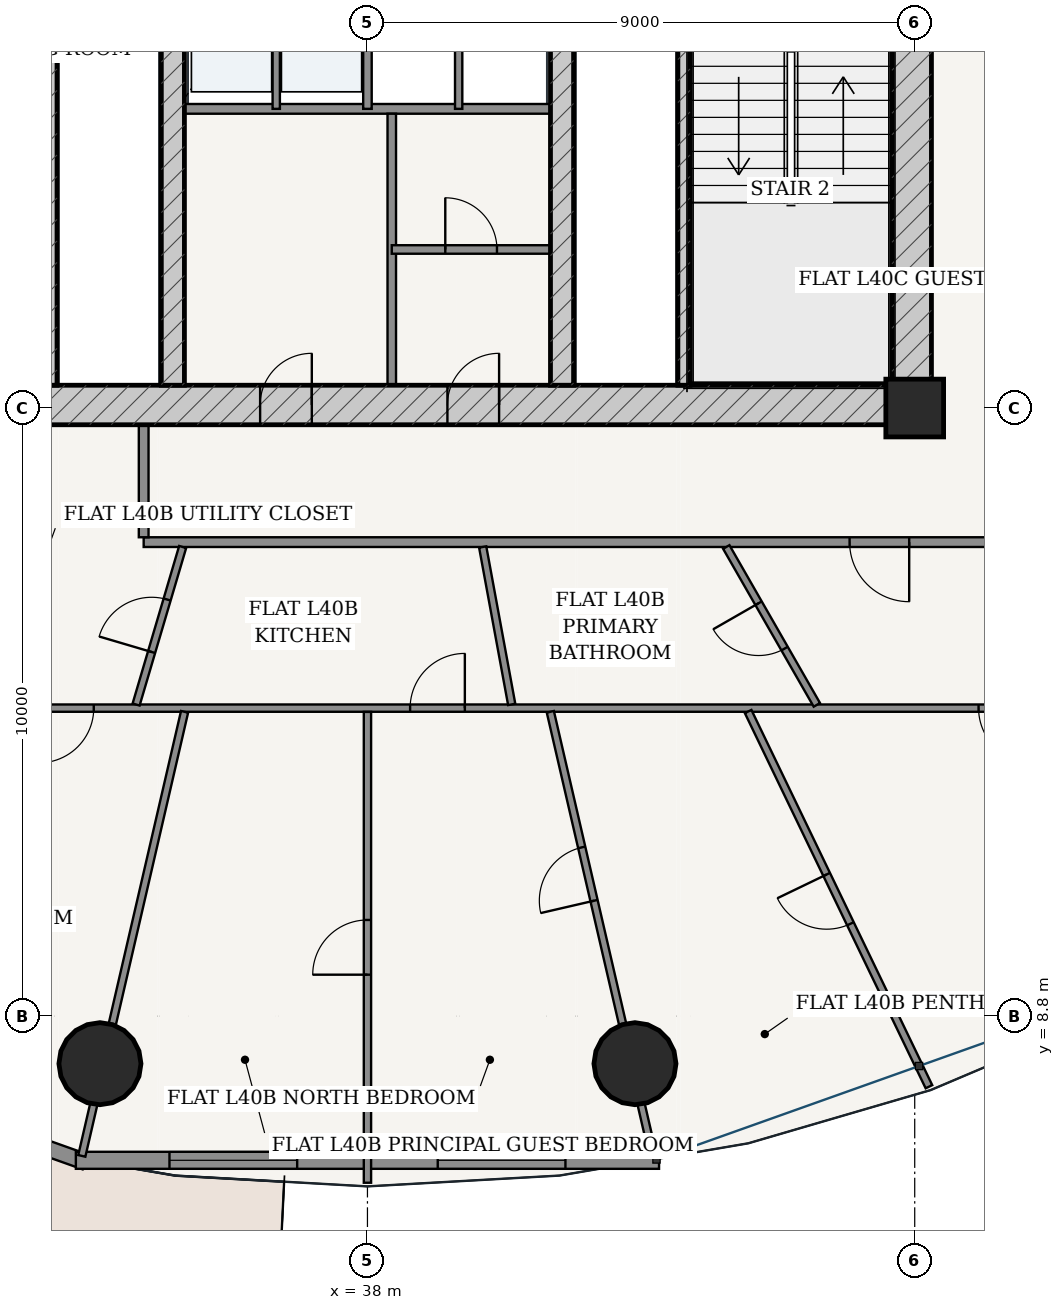
"""IFC4 building model, lengths in metres.
Left out: names, types, materials, properties, quantities, classifications, styles, units other than length and angle.
Written with IfcOpenShell. Run it as: python <this file> out.ifc"""

import sys

from ifc_helpers import new_model, si_unit, direction, frame, frame_2d, origin, origin_2d, place, context, subcontext, project, spatial, rectangle, hollow_circle, extrude, source, transform, mapped, element, fill, save


model = new_model("IFC4")
c1 = context("Model", 3, precision=1e-05, world=origin(), true_north=direction((-0.2419218956, 0.970295726276)))
c2 = subcontext(c1, "Body", "Model", "MODEL_VIEW")
j1 = project(units=[si_unit("LENGTHUNIT", "METRE"), si_unit("PLANEANGLEUNIT", "RADIAN")], contexts=[c1])
p1 = place(None, origin())
s1 = spatial("IfcSite", under=j1, at=p1, CompositionType="ELEMENT")
p2 = place(p1, origin())
s2 = spatial("IfcBuilding", under=s1, at=p2, CompositionType="ELEMENT")
p3 = place(p2, frame((0.0, 0.0, 153.4)))
s3 = spatial("IfcBuildingStorey", under=s2, at=p3, CompositionType="ELEMENT", Elevation=153.4)
p4 = place(p3, frame((47.0, 18.8, 0.0), z_axis=(0.0, 0.0, 1.0), x_axis=(1.0, 0.0, 0.0)))
e1 = element("IfcColumn", 1, at=p4, inside=s3, PredefinedType="COLUMN", context=c2, shape_type="SweptSolid", body=[
    extrude(rectangle(XDim=0.95, YDim=0.95, at=origin_2d()), origin(), (0.0, 0.0, 1.0), 3.6),
])
p5 = place(p3, frame((28.725, 18.85, 0.0), z_axis=(0.0, 0.0, 1.0), x_axis=(1.0, 0.0, 0.0)))
e2 = element("IfcWall", 2, at=p5, inside=s3, PredefinedType="SHEAR", context=c2, shape_type="SweptSolid", body=[
    extrude(rectangle(XDim=18.55, YDim=0.65, at=frame_2d((9.275, 0.0))), origin(), (0.0, 0.0, 1.0), 3.33),
])
p6 = place(p5, frame((7.51, 0.0, 0.0)))
e3 = element("IfcOpeningElement", 3, at=p6, cuts=e2, PredefinedType="OPENING", context=c2, shape_type="SweptSolid", body=[
    extrude(rectangle(XDim=0.85, YDim=2.1, at=frame_2d((0.425, 1.05))), frame((0.0, 0.335, 0.0), z_axis=(0.0, -1.0, 0.0), x_axis=(1.0, 0.0, 0.0)), (0.0, 0.0, 1.0), 0.67),
])
p7 = place(p5, frame((10.59, 0.0, 0.0)))
e4 = element("IfcOpeningElement", 4, at=p7, cuts=e2, PredefinedType="OPENING", context=c2, shape_type="SweptSolid", body=[
    extrude(rectangle(XDim=0.85, YDim=2.1, at=frame_2d((0.425, 1.05))), frame((0.0, 0.335, 0.0), z_axis=(0.0, -1.0, 0.0), x_axis=(1.0, 0.0, 0.0)), (0.0, 0.0, 1.0), 0.67),
])
p8 = place(p3, frame((46.95, 19.175, 0.0), z_axis=(0.0, 0.0, 1.0), x_axis=(0.0, 1.0, 0.0)))
e5 = element("IfcWall", 5, at=p8, inside=s3, PredefinedType="SHEAR", context=c2, shape_type="SweptSolid", body=[
    extrude(rectangle(XDim=15.25, YDim=0.65, at=frame_2d((7.625, 0.0))), origin(), (0.0, 0.0, 1.0), 3.33),
])
p9 = place(p8, frame((9.875, 0.0, 0.0)))
e6 = element("IfcOpeningElement", 6, at=p9, cuts=e5, PredefinedType="OPENING", context=c2, shape_type="SweptSolid", body=[
    extrude(rectangle(XDim=1.5, YDim=2.2, at=frame_2d((0.75, 1.1))), frame((0.0, 0.335, 0.0), z_axis=(0.0, -1.0, 0.0), x_axis=(1.0, 0.0, 0.0)), (0.0, 0.0, 1.0), 0.67),
])
for number, where, z_axis, x_axis in (
    (7, (32.795, 19.175, 0.0), (0.0, 0.0, 1.0), (0.0, 1.0, 0.0)),
    (8, (43.205, 19.175, 0.0), (0.0, 0.0, 1.0), (0.0, 1.0, 0.0)),
):
    element("IfcWall", number, at=place(p3, frame(where, z_axis=z_axis, x_axis=x_axis)), inside=s3, PredefinedType="SOLIDWALL", context=c2, shape_type="SweptSolid", body=[
        extrude(rectangle(XDim=7.375, YDim=0.2, at=frame_2d((3.688, 0.0))), origin(), (0.0, 0.0, 1.0), 3.33),
    ])
p10 = place(p3, frame((34.8, 19.175, 0.0), z_axis=(0.0, 0.0, 1.0), x_axis=(0.0, 1.0, 0.0)))
e9 = element("IfcWall", 9, at=p10, inside=s3, PredefinedType="SHEAR", context=c2, shape_type="SweptSolid", body=[
    extrude(rectangle(XDim=15.25, YDim=0.38, at=frame_2d((7.625, 0.0))), origin(), (0.0, 0.0, 1.0), 3.33),
])
p11 = place(p10, frame((7.8, 0.0, 0.0)))
e10 = element("IfcOpeningElement", 10, at=p11, cuts=e9, PredefinedType="OPENING", context=c2, shape_type="SweptSolid", body=[
    extrude(rectangle(XDim=1.05, YDim=2.15, at=frame_2d((0.525, 1.075))), frame((0.0, 0.2, 0.0), z_axis=(0.0, -1.0, 0.0), x_axis=(1.0, 0.0, 0.0)), (0.0, 0.0, 1.0), 0.4),
])
p12 = place(p3, frame((41.2, 19.175, 0.0), z_axis=(0.0, 0.0, 1.0), x_axis=(0.0, 1.0, 0.0)))
e11 = element("IfcWall", 11, at=p12, inside=s3, PredefinedType="SHEAR", context=c2, shape_type="SweptSolid", body=[
    extrude(rectangle(XDim=15.25, YDim=0.38, at=frame_2d((7.625, 0.0))), origin(), (0.0, 0.0, 1.0), 3.33),
])
p13 = place(p12, frame((7.8, 0.0, 0.0)))
e12 = element("IfcOpeningElement", 12, at=p13, cuts=e11, PredefinedType="OPENING", context=c2, shape_type="SweptSolid", body=[
    extrude(rectangle(XDim=1.05, YDim=2.15, at=frame_2d((0.525, 1.075))), frame((0.0, 0.2, 0.0), z_axis=(0.0, -1.0, 0.0), x_axis=(1.0, 0.0, 0.0)), (0.0, 0.0, 1.0), 0.4),
])
for number, where, z_axis, x_axis in (
    (13, (33.601, 8.018, 0.0), (0.0, 0.0, 1.0), (1.0, 0.0, 0.0)),
    (14, (42.399, 8.018, 0.0), (0.0, 0.0, 1.0), (1.0, 0.0, 0.0)),
):
    element("IfcColumn", number, at=place(p3, frame(where, z_axis=z_axis, x_axis=x_axis)), inside=s3, PredefinedType="COLUMN", context=c2, shape_type="SweptSolid", body=[
        extrude(hollow_circle(Radius=0.675, WallThickness=0.042, at=origin_2d()), origin(), (0.0, 0.0, 1.0), 3.6),
    ])
p14 = place(p3, frame((24.497, 9.557, 0.0), z_axis=(0.0, 0.0, 1.0), x_axis=(0.942103604331, -0.335321932934, 0.0)))
e15 = element("IfcWall", 15, at=p14, inside=s3, PredefinedType="SOLIDWALL", context=c2, shape_type="SweptSolid", body=[
    extrude(rectangle(XDim=9.408, YDim=0.26, at=frame_2d((4.704, 0.0))), origin(), (0.0, 0.0, 1.0), 3.33),
])
p15 = place(p14, frame((4.029, 0.0, 0.0)))
e16 = element("IfcOpeningElement", 16, at=p15, cuts=e15, PredefinedType="OPENING", context=c2, shape_type="SweptSolid", body=[
    extrude(rectangle(XDim=1.35, YDim=2.2, at=frame_2d((0.675, 1.1))), frame((0.0, 0.14, 0.0), z_axis=(0.0, -1.0, 0.0), x_axis=(1.0, 0.0, 0.0)), (0.0, 0.0, 1.0), 0.28),
])
p16 = place(p3, frame((33.205, 6.429, 0.0), z_axis=(0.0, 0.0, 1.0), x_axis=(1.0, 0.0, 0.0)))
e17 = element("IfcWall", 17, at=p16, inside=s3, PredefinedType="SOLIDWALL", context=c2, shape_type="SweptSolid", body=[
    extrude(rectangle(XDim=9.591, YDim=0.28, at=frame_2d((4.795, 0.0))), origin(), (0.0, 0.0, 1.0), 3.33),
])
p17 = place(p16, frame((1.54, 0.0, 0.85)))
e18 = element("IfcOpeningElement", 18, at=p17, cuts=e17, PredefinedType="OPENING", context=c2, shape_type="SweptSolid", body=[
    extrude(rectangle(XDim=2.1, YDim=1.95, at=frame_2d((1.05, 0.975))), frame((0.0, 0.15, 0.0), z_axis=(0.0, -1.0, 0.0), x_axis=(1.0, 0.0, 0.0)), (0.0, 0.0, 1.0), 0.3),
])
p18 = place(p16, frame((5.951, 0.0, 0.85)))
e19 = element("IfcOpeningElement", 19, at=p18, cuts=e17, PredefinedType="OPENING", context=c2, shape_type="SweptSolid", body=[
    extrude(rectangle(XDim=2.1, YDim=1.95, at=frame_2d((1.05, 0.975))), frame((0.0, 0.15, 0.0), z_axis=(0.0, -1.0, 0.0), x_axis=(1.0, 0.0, 0.0)), (0.0, 0.0, 1.0), 0.3),
])
p19 = place(p3, frame((34.99, 23.72, 0.0), z_axis=(0.0, 0.0, 1.0), x_axis=(1.0, 0.0, 0.0)))
e20 = element("IfcWall", 20, at=p19, inside=s3, PredefinedType="PARTITIONING", context=c2, shape_type="SweptSolid", body=[
    extrude(rectangle(XDim=6.02, YDim=0.16, at=frame_2d((3.01, 0.0))), origin(), (0.0, 0.0, 1.0), 3.33),
])
p20 = place(p3, frame((36.5, 23.72, 0.0), z_axis=(0.0, 0.0, 1.0), x_axis=(0.0, 1.0, 0.0)))
e21 = element("IfcWall", 21, at=p20, inside=s3, PredefinedType="PARTITIONING", context=c2, shape_type="SweptSolid", body=[
    extrude(rectangle(XDim=2.56, YDim=0.12, at=frame_2d((1.28, 0.0))), origin(), (0.0, 0.0, 1.0), 3.33),
])
p21 = place(p3, frame((38.0, 23.72, 0.0), z_axis=(0.0, 0.0, 1.0), x_axis=(0.0, 1.0, 0.0)))
e22 = element("IfcWall", 22, at=p21, inside=s3, PredefinedType="PARTITIONING", context=c2, shape_type="SweptSolid", body=[
    extrude(rectangle(XDim=2.56, YDim=0.14, at=frame_2d((1.28, 0.0))), origin(), (0.0, 0.0, 1.0), 3.33),
])
p22 = place(p3, frame((39.5, 23.72, 0.0), z_axis=(0.0, 0.0, 1.0), x_axis=(0.0, 1.0, 0.0)))
e23 = element("IfcWall", 23, at=p22, inside=s3, PredefinedType="PARTITIONING", context=c2, shape_type="SweptSolid", body=[
    extrude(rectangle(XDim=2.56, YDim=0.12, at=frame_2d((1.28, 0.0))), origin(), (0.0, 0.0, 1.0), 3.33),
])
p23 = place(p3, frame((38.4, 19.175, 0.0), z_axis=(0.0, 0.0, 1.0), x_axis=(0.0, 1.0, 0.0)))
e24 = element("IfcWall", 24, at=p23, inside=s3, PredefinedType="PARTITIONING", context=c2, shape_type="SweptSolid", body=[
    extrude(rectangle(XDim=4.465, YDim=0.14, at=frame_2d((2.232, 0.0))), origin(), (0.0, 0.0, 1.0), 3.33),
])
p24 = place(p3, frame((38.4, 21.407, 0.0), z_axis=(0.0, 0.0, 1.0), x_axis=(1.0, 0.0, 0.0)))
e25 = element("IfcWall", 25, at=p24, inside=s3, PredefinedType="PARTITIONING", context=c2, shape_type="SweptSolid", body=[
    extrude(rectangle(XDim=2.61, YDim=0.14, at=frame_2d((1.305, 0.0))), origin(), (0.0, 0.0, 1.0), 3.33),
])
p25 = place(p24, frame((0.88, 0.0, 0.0)))
e26 = element("IfcOpeningElement", 26, at=p25, cuts=e25, PredefinedType="OPENING", context=c2, shape_type="SweptSolid", body=[
    extrude(rectangle(XDim=0.85, YDim=2.1, at=frame_2d((0.425, 1.05))), frame((0.0, 0.08, 0.0), z_axis=(0.0, -1.0, 0.0), x_axis=(1.0, 0.0, 0.0)), (0.0, 0.0, 1.0), 0.16),
])
p26 = place(p3, frame((34.32, 16.595, 0.0), z_axis=(0.0, 0.0, 1.0), x_axis=(1.0, 0.0, 0.0)))
e27 = element("IfcWall", 27, at=p26, inside=s3, PredefinedType="PARTITIONING", context=c2, shape_type="SweptSolid", body=[
    extrude(rectangle(XDim=14.885, YDim=0.16, at=frame_2d((7.442, 0.0))), origin(), (0.0, 0.0, 1.0), 2.776),
])
p27 = place(p26, frame((11.609, 0.0, 0.0)))
e28 = element("IfcOpeningElement", 28, at=p27, cuts=e27, PredefinedType="OPENING", context=c2, shape_type="SweptSolid", body=[
    extrude(rectangle(XDim=0.98, YDim=2.2, at=frame_2d((0.49, 1.1))), frame((0.0, 0.09, 0.0), z_axis=(0.0, -1.0, 0.0), x_axis=(1.0, 0.0, 0.0)), (0.0, 0.0, 1.0), 0.18),
])
p28 = place(p3, frame((34.32, 16.675, 0.0), z_axis=(0.0, 0.0, 1.0), x_axis=(0.0, 1.0, 0.0)))
e29 = element("IfcWall", 29, at=p28, inside=s3, PredefinedType="PARTITIONING", context=c2, shape_type="SweptSolid", body=[
    extrude(rectangle(XDim=1.85, YDim=0.16, at=frame_2d((0.925, 0.0))), origin(), (0.0, 0.0, 1.0), 3.33),
])
p29 = place(p3, frame((51.935, 13.865, 0.0), z_axis=(0.0, 0.0, 1.0), x_axis=(-1.0, 0.0, 0.0)))
e30 = element("IfcWall", 30, at=p29, inside=s3, PredefinedType="PARTITIONING", context=c2, shape_type="SweptSolid", body=[
    extrude(rectangle(XDim=20.345, YDim=0.12, at=frame_2d((10.172, 0.0))), origin(), (0.0, 0.0, 1.0), 2.776),
])
p30 = place(p29, frame((2.985, 0.0, 0.0)))
e31 = element("IfcOpeningElement", 31, at=p30, cuts=e30, PredefinedType="OPENING", context=c2, shape_type="SweptSolid", body=[
    extrude(rectangle(XDim=0.9, YDim=2.15, at=frame_2d((0.45, 1.075))), frame((0.0, 0.07, 0.0), z_axis=(0.0, -1.0, 0.0), x_axis=(1.0, 0.0, 0.0)), (0.0, 0.0, 1.0), 0.14),
])
p31 = place(p29, frame((12.333, 0.0, 0.0)))
e32 = element("IfcOpeningElement", 32, at=p31, cuts=e30, PredefinedType="OPENING", context=c2, shape_type="SweptSolid", body=[
    extrude(rectangle(XDim=0.9, YDim=2.15, at=frame_2d((0.45, 1.075))), frame((0.0, 0.07, 0.0), z_axis=(0.0, -1.0, 0.0), x_axis=(1.0, 0.0, 0.0)), (0.0, 0.0, 1.0), 0.14),
])
p32 = place(p29, frame((18.436, 0.0, 0.0)))
e33 = element("IfcOpeningElement", 33, at=p32, cuts=e30, PredefinedType="OPENING", context=c2, shape_type="SweptSolid", body=[
    extrude(rectangle(XDim=0.9, YDim=2.15, at=frame_2d((0.45, 1.075))), frame((0.0, 0.07, 0.0), z_axis=(0.0, -1.0, 0.0), x_axis=(1.0, 0.0, 0.0)), (0.0, 0.0, 1.0), 0.14),
])
p33 = place(p3, frame((34.992, 13.805, 0.0), z_axis=(0.0, 0.0, 1.0), x_axis=(-0.225447000045, -0.974255433739, 0.0)))
e34 = element("IfcWall", 34, at=p33, inside=s3, PredefinedType="PARTITIONING", context=c2, shape_type="SweptSolid", body=[
    extrude(rectangle(XDim=7.496, YDim=0.12, at=frame_2d((3.748, 0.0))), origin(), (0.0, 0.0, 1.0), 2.776),
])
p34 = place(p3, frame((38.0, 13.803, 0.0), z_axis=(0.0, 0.0, 1.0), x_axis=(0.0, -1.0, 0.0)))
e35 = element("IfcWall", 35, at=p34, inside=s3, PredefinedType="PARTITIONING", context=c2, shape_type="SweptSolid", body=[
    extrude(rectangle(XDim=7.743, YDim=0.12, at=frame_2d((3.872, 0.0))), origin(), (0.0, 0.0, 1.0), 2.846),
])
p35 = place(p34, frame((3.421, 0.0, 0.0)))
e36 = element("IfcOpeningElement", 36, at=p35, cuts=e35, PredefinedType="OPENING", context=c2, shape_type="SweptSolid", body=[
    extrude(rectangle(XDim=0.9, YDim=2.15, at=frame_2d((0.45, 1.075))), frame((0.0, 0.07, 0.0), z_axis=(0.0, -1.0, 0.0), x_axis=(1.0, 0.0, 0.0)), (0.0, 0.0, 1.0), 0.14),
])
p36 = place(p3, frame((41.008, 13.805, 0.0), z_axis=(0.0, 0.0, 1.0), x_axis=(0.225447000045, -0.974255433739, 0.0)))
e37 = element("IfcWall", 37, at=p36, inside=s3, PredefinedType="PARTITIONING", context=c2, shape_type="SweptSolid", body=[
    extrude(rectangle(XDim=7.496, YDim=0.12, at=frame_2d((3.748, 0.0))), origin(), (0.0, 0.0, 1.0), 2.776),
])
p37 = place(p36, frame((2.289, 0.0, 0.0)))
e38 = element("IfcOpeningElement", 38, at=p37, cuts=e37, PredefinedType="OPENING", context=c2, shape_type="SweptSolid", body=[
    extrude(rectangle(XDim=0.9, YDim=2.15, at=frame_2d((0.45, 1.075))), frame((0.0, 0.07, 0.0), z_axis=(0.0, -1.0, 0.0), x_axis=(1.0, 0.0, 0.0)), (0.0, 0.0, 1.0), 0.14),
])
p38 = place(p3, frame((44.26, 13.809, 0.0), z_axis=(0.0, 0.0, 1.0), x_axis=(0.434162832987, -0.900834410118, 0.0)))
e39 = element("IfcWall", 39, at=p38, inside=s3, PredefinedType="PARTITIONING", context=c2, shape_type="SweptSolid", body=[
    extrude(rectangle(XDim=6.849, YDim=0.12, at=frame_2d((3.425, 0.0))), origin(), (0.0, 0.0, 1.0), 2.846),
])
p39 = place(p38, frame((2.975, 0.0, 0.0)))
e40 = element("IfcOpeningElement", 40, at=p39, cuts=e39, PredefinedType="OPENING", context=c2, shape_type="SweptSolid", body=[
    extrude(rectangle(XDim=0.9, YDim=2.15, at=frame_2d((0.45, 1.075))), frame((0.0, 0.07, 0.0), z_axis=(0.0, -1.0, 0.0), x_axis=(1.0, 0.0, 0.0)), (0.0, 0.0, 1.0), 0.14),
])
p40 = place(p3, frame((34.961, 16.515, 0.0), z_axis=(0.0, 0.0, 1.0), x_axis=(-0.283365034326, -0.959012125743, 0.0)))
e41 = element("IfcWall", 41, at=p40, inside=s3, PredefinedType="PARTITIONING", context=c2, shape_type="SweptSolid", body=[
    extrude(rectangle(XDim=2.701, YDim=0.12, at=frame_2d((1.351, 0.0))), origin(), (0.0, 0.0, 1.0), 3.33),
])
p41 = place(p40, frame((0.901, 0.0, 0.0)))
e42 = element("IfcOpeningElement", 42, at=p41, cuts=e41, PredefinedType="OPENING", context=c2, shape_type="SweptSolid", body=[
    extrude(rectangle(XDim=0.9, YDim=2.15, at=frame_2d((0.45, 1.075))), frame((0.0, 0.07, 0.0), z_axis=(0.0, -1.0, 0.0), x_axis=(1.0, 0.0, 0.0)), (0.0, 0.0, 1.0), 0.14),
])
p42 = place(p3, frame((39.895, 16.515, 0.0), z_axis=(0.0, 0.0, 1.0), x_axis=(0.181219081065, -0.983442751083, 0.0)))
e43 = element("IfcWall", 43, at=p42, inside=s3, PredefinedType="PARTITIONING", context=c2, shape_type="SweptSolid", body=[
    extrude(rectangle(XDim=2.633, YDim=0.12, at=frame_2d((1.316, 0.0))), origin(), (0.0, 0.0, 1.0), 3.33),
])
p43 = place(p3, frame((43.901, 16.515, 0.0), z_axis=(0.0, 0.0, 1.0), x_axis=(0.497640283609, -0.86738350695, 0.0)))
e44 = element("IfcWall", 44, at=p43, inside=s3, PredefinedType="PARTITIONING", context=c2, shape_type="SweptSolid", body=[
    extrude(rectangle(XDim=2.993, YDim=0.12, at=frame_2d((1.497, 0.0))), origin(), (0.0, 0.0, 1.0), 3.005),
])
p44 = place(p43, frame((1.067, 0.0, 0.0)))
e45 = element("IfcOpeningElement", 45, at=p44, cuts=e44, PredefinedType="OPENING", context=c2, shape_type="SweptSolid", body=[
    extrude(rectangle(XDim=0.86, YDim=2.15, at=frame_2d((0.43, 1.075))), frame((0.0, 0.07, 0.0), z_axis=(0.0, -1.0, 0.0), x_axis=(1.0, 0.0, 0.0)), (0.0, 0.0, 1.0), 0.14),
])
m1 = source(origin(), c2, "Body", "SweptSolid", [
    extrude(rectangle(XDim=2.1, YDim=1.95, at=frame_2d((1.05, 0.975))), frame((0.0, 0.03, 0.0), z_axis=(0.0, -1.0, 0.0), x_axis=(1.0, 0.0, 0.0)), (0.0, 0.0, 1.0), 0.06),
])
p45 = place(p17, origin())
e46 = element("IfcWindow", 46, at=p45, inside=s3, PartitioningType="SINGLE_PANEL", PredefinedType="WINDOW", context=c2, shape_type="MappedRepresentation", body=[
    mapped(m1, transform((0.0, 0.0, 0.0), scale=1.0)),
])
fill(e18, e46)
p46 = place(p18, origin())
e47 = element("IfcWindow", 47, at=p46, inside=s3, PartitioningType="SINGLE_PANEL", PredefinedType="WINDOW", context=c2, shape_type="MappedRepresentation", body=[
    mapped(m1, transform((0.0, 0.0, 0.0), scale=1.0)),
])
fill(e19, e47)
m2 = source(origin(), c2, "Body", "SweptSolid", [
    extrude(rectangle(XDim=0.85, YDim=2.1, at=frame_2d((0.425, 1.05))), frame((0.0, 0.025, 0.0), z_axis=(0.0, -1.0, 0.0), x_axis=(1.0, 0.0, 0.0)), (0.0, 0.0, 1.0), 0.05),
])
p47 = place(p6, origin())
e48 = element("IfcDoor", 48, at=p47, inside=s3, OperationType="SINGLE_SWING_RIGHT", PredefinedType="DOOR", context=c2, shape_type="MappedRepresentation", body=[
    mapped(m2, transform((0.0, 0.0, 0.0), scale=1.0)),
])
fill(e3, e48)
p48 = place(p7, origin())
e49 = element("IfcDoor", 49, at=p48, inside=s3, OperationType="SINGLE_SWING_RIGHT", PredefinedType="DOOR", context=c2, shape_type="MappedRepresentation", body=[
    mapped(m2, transform((0.0, 0.0, 0.0), scale=1.0)),
])
fill(e4, e49)
p49 = place(p25, origin())
e50 = element("IfcDoor", 50, at=p49, inside=s3, OperationType="SINGLE_SWING_LEFT", PredefinedType="DOOR", context=c2, shape_type="MappedRepresentation", body=[
    mapped(m2, transform((0.0, 0.0, 0.0), scale=1.0)),
])
fill(e26, e50)
m3 = source(origin(), c2, "Body", "SweptSolid", [
    extrude(rectangle(XDim=0.98, YDim=2.2, at=frame_2d((0.49, 1.1))), frame((0.0, 0.025, 0.0), z_axis=(0.0, -1.0, 0.0), x_axis=(1.0, 0.0, 0.0)), (0.0, 0.0, 1.0), 0.05),
])
p50 = place(p27, frame((0.98, 0.0, 0.0), z_axis=(0.0, 0.0, 1.0), x_axis=(-1.0, 0.0, 0.0)))
e51 = element("IfcDoor", 51, at=p50, inside=s3, OperationType="SINGLE_SWING_LEFT", PredefinedType="DOOR", context=c2, shape_type="MappedRepresentation", body=[
    mapped(m3, transform((0.0, 0.0, 0.0), scale=1.0)),
])
fill(e28, e51)
m4 = source(origin(), c2, "Body", "SweptSolid", [
    extrude(rectangle(XDim=0.86, YDim=2.15, at=frame_2d((0.43, 1.075))), frame((0.0, 0.025, 0.0), z_axis=(0.0, -1.0, 0.0), x_axis=(1.0, 0.0, 0.0)), (0.0, 0.0, 1.0), 0.05),
])
p51 = place(p44, frame((0.86, 0.0, 0.0), z_axis=(0.0, 0.0, 1.0), x_axis=(-1.0, 0.0, 0.0)))
e52 = element("IfcDoor", 52, at=p51, inside=s3, OperationType="SINGLE_SWING_RIGHT", PredefinedType="DOOR", context=c2, shape_type="MappedRepresentation", body=[
    mapped(m4, transform((0.0, 0.0, 0.0), scale=1.0)),
])
fill(e45, e52)
m5 = source(origin(), c2, "Body", "SweptSolid", [
    extrude(rectangle(XDim=0.9, YDim=2.15, at=frame_2d((0.45, 1.075))), frame((0.0, 0.025, 0.0), z_axis=(0.0, -1.0, 0.0), x_axis=(1.0, 0.0, 0.0)), (0.0, 0.0, 1.0), 0.05),
])
p52 = place(p30, origin())
e53 = element("IfcDoor", 53, at=p52, inside=s3, OperationType="SINGLE_SWING_LEFT", PredefinedType="DOOR", context=c2, shape_type="MappedRepresentation", body=[
    mapped(m5, transform((0.0, 0.0, 0.0), scale=1.0)),
])
fill(e31, e53)
p53 = place(p39, frame((0.9, 0.0, 0.0), z_axis=(0.0, 0.0, 1.0), x_axis=(-1.0, 0.0, 0.0)))
e54 = element("IfcDoor", 54, at=p53, inside=s3, OperationType="SINGLE_SWING_RIGHT", PredefinedType="DOOR", context=c2, shape_type="MappedRepresentation", body=[
    mapped(m5, transform((0.0, 0.0, 0.0), scale=1.0)),
])
fill(e40, e54)
p54 = place(p37, frame((0.9, 0.0, 0.0), z_axis=(0.0, 0.0, 1.0), x_axis=(-1.0, 0.0, 0.0)))
e55 = element("IfcDoor", 55, at=p54, inside=s3, OperationType="SINGLE_SWING_LEFT", PredefinedType="DOOR", context=c2, shape_type="MappedRepresentation", body=[
    mapped(m5, transform((0.0, 0.0, 0.0), scale=1.0)),
])
fill(e38, e55)
p55 = place(p31, frame((0.9, 0.0, 0.0), z_axis=(0.0, 0.0, 1.0), x_axis=(-1.0, 0.0, 0.0)))
e56 = element("IfcDoor", 56, at=p55, inside=s3, OperationType="SINGLE_SWING_RIGHT", PredefinedType="DOOR", context=c2, shape_type="MappedRepresentation", body=[
    mapped(m5, transform((0.0, 0.0, 0.0), scale=1.0)),
])
fill(e32, e56)
p56 = place(p41, frame((0.9, 0.0, 0.0), z_axis=(0.0, 0.0, 1.0), x_axis=(-1.0, 0.0, 0.0)))
e57 = element("IfcDoor", 57, at=p56, inside=s3, OperationType="SINGLE_SWING_LEFT", PredefinedType="DOOR", context=c2, shape_type="MappedRepresentation", body=[
    mapped(m5, transform((0.0, 0.0, 0.0), scale=1.0)),
])
fill(e42, e57)
p57 = place(p32, origin())
e58 = element("IfcDoor", 58, at=p57, inside=s3, OperationType="SINGLE_SWING_RIGHT", PredefinedType="DOOR", context=c2, shape_type="MappedRepresentation", body=[
    mapped(m5, transform((0.0, 0.0, 0.0), scale=1.0)),
])
fill(e33, e58)
p58 = place(p35, frame((0.9, 0.0, 0.0), z_axis=(0.0, 0.0, 1.0), x_axis=(-1.0, 0.0, 0.0)))
e59 = element("IfcDoor", 59, at=p58, inside=s3, OperationType="SINGLE_SWING_LEFT", PredefinedType="DOOR", context=c2, shape_type="MappedRepresentation", body=[
    mapped(m5, transform((0.0, 0.0, 0.0), scale=1.0)),
])
fill(e36, e59)
save(model, sys.argv[1])
